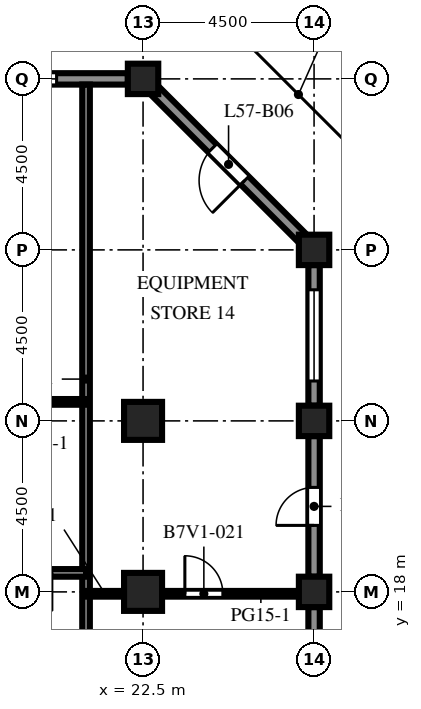
"""IFC4 building model, lengths in metres.
Left out: names, types, materials, properties, quantities, classifications, styles, units other than length and angle.
Written with IfcOpenShell. Run it as: python <this file> out.ifc"""

import sys

from ifc_helpers import new_model, si_unit, direction, frame, frame_2d, origin, origin_2d, place, context, subcontext, project, spatial, rectangle, extrude, element, fill, save


model = new_model("IFC4")
c1 = context("Model", 3, precision=1e-05, world=origin(), true_north=direction((0.0, 1.0)))
c2 = subcontext(c1, "Body", "Model", "MODEL_VIEW")
j1 = project(units=[si_unit("LENGTHUNIT", "METRE"), si_unit("PLANEANGLEUNIT", "RADIAN")], contexts=[c1])
p1 = place(None, origin())
s1 = spatial("IfcSite", under=j1, at=p1, CompositionType="ELEMENT")
p2 = place(p1, origin())
s2 = spatial("IfcBuilding", under=s1, at=p2, CompositionType="ELEMENT")
p3 = place(p2, frame((0.0, 0.0, 252.1)))
s3 = spatial("IfcBuildingStorey", under=s2, at=p3, CompositionType="ELEMENT", Elevation=252.1)
for number, where, z_axis, x_axis in (
    (1, (22.5, 31.5, 0.0), (0.0, 0.0, 1.0), (1.0, 0.0, 0.0)),
    (2, (27.0, 18.0, 0.0), (0.0, 0.0, 1.0), (1.0, 0.0, 0.0)),
    (3, (27.0, 22.5, 0.0), (0.0, 0.0, 1.0), (1.0, 0.0, 0.0)),
    (4, (27.0, 27.0, 0.0), (0.0, 0.0, 1.0), (1.0, 0.0, 0.0)),
):
    element("IfcColumn", number, at=place(p3, frame(where, z_axis=z_axis, x_axis=x_axis)), inside=s3, PredefinedType="COLUMN", context=c2, shape_type="SweptSolid", body=[
        extrude(rectangle(XDim=0.8, YDim=0.8, at=origin_2d()), origin(), (0.0, 0.0, 1.0), 4.1),
    ])
for number, where, z_axis, x_axis in (
    (5, (22.5, 18.0, 0.0), (0.0, 0.0, 1.0), (1.0, 0.0, 0.0)),
    (6, (22.5, 22.5, 0.0), (0.0, 0.0, 1.0), (1.0, 0.0, 0.0)),
):
    element("IfcColumn", number, at=place(p3, frame(where, z_axis=z_axis, x_axis=x_axis)), inside=s3, PredefinedType="COLUMN", context=c2, shape_type="SweptSolid", body=[
        extrude(rectangle(XDim=1.0, YDim=1.0, at=origin_2d()), origin(), (0.0, 0.0, 1.0), 4.1),
    ])
p4 = place(p3, frame((27.0, 17.6, 0.0), z_axis=(0.0, 0.0, 1.0), x_axis=(0.0, -1.0, 0.0)))
e7 = element("IfcWall", 7, at=p4, inside=s3, PredefinedType="SOLIDWALL", context=c2, shape_type="SweptSolid", body=[
    extrude(rectangle(XDim=3.7, YDim=0.3, at=frame_2d((1.85, 0.0))), origin(), (0.0, 0.0, 1.0), 2.85),
])
p5 = place(p4, frame((0.65, 0.0, 0.8)))
e8 = element("IfcOpeningElement", 8, at=p5, cuts=e7, PredefinedType="OPENING", context=c2, shape_type="SweptSolid", body=[
    extrude(rectangle(XDim=2.4, YDim=1.7, at=frame_2d((1.2, 0.85))), frame((0.0, 0.16, 0.0), z_axis=(0.0, -1.0, 0.0), x_axis=(1.0, 0.0, 0.0)), (0.0, 0.0, 1.0), 0.32),
])
p6 = place(p3, frame((27.0, 22.1, 0.0), z_axis=(0.0, 0.0, 1.0), x_axis=(0.0, -1.0, 0.0)))
e9 = element("IfcWall", 9, at=p6, inside=s3, PredefinedType="SOLIDWALL", context=c2, shape_type="SweptSolid", body=[
    extrude(rectangle(XDim=3.7, YDim=0.3, at=frame_2d((1.85, 0.0))), origin(), (0.0, 0.0, 1.0), 2.85),
])
p7 = place(p6, frame((1.35, 0.0, 0.0)))
e10 = element("IfcOpeningElement", 10, at=p7, cuts=e9, PredefinedType="OPENING", context=c2, shape_type="SweptSolid", body=[
    extrude(rectangle(XDim=1.0, YDim=2.2, at=frame_2d((0.5, 1.1))), frame((0.0, 0.16, 0.0), z_axis=(0.0, -1.0, 0.0), x_axis=(1.0, 0.0, 0.0)), (0.0, 0.0, 1.0), 0.32),
])
p8 = place(p3, frame((27.0, 26.6, 0.0), z_axis=(0.0, 0.0, 1.0), x_axis=(0.0, -1.0, 0.0)))
e11 = element("IfcWall", 11, at=p8, inside=s3, PredefinedType="SOLIDWALL", context=c2, shape_type="SweptSolid", body=[
    extrude(rectangle(XDim=3.7, YDim=0.3, at=frame_2d((1.85, 0.0))), origin(), (0.0, 0.0, 1.0), 2.85),
])
p9 = place(p8, frame((0.65, 0.0, 0.8)))
e12 = element("IfcOpeningElement", 12, at=p9, cuts=e11, PredefinedType="OPENING", context=c2, shape_type="SweptSolid", body=[
    extrude(rectangle(XDim=2.4, YDim=1.7, at=frame_2d((1.2, 0.85))), frame((0.0, 0.16, 0.0), z_axis=(0.0, -1.0, 0.0), x_axis=(1.0, 0.0, 0.0)), (0.0, 0.0, 1.0), 0.32),
])
p10 = place(p3, frame((22.794, 31.206, 0.0), z_axis=(0.0, 0.0, 1.0), x_axis=(0.707106781187, -0.707106781187, 0.0)))
e13 = element("IfcWall", 13, at=p10, inside=s3, PredefinedType="SOLIDWALL", context=c2, shape_type="SweptSolid", body=[
    extrude(rectangle(XDim=5.532, YDim=0.3, at=frame_2d((2.766, 0.0))), origin(), (0.0, 0.0, 1.0), 2.85),
])
p11 = place(p10, frame((2.166, 0.0, 0.0)))
e14 = element("IfcOpeningElement", 14, at=p11, cuts=e13, PredefinedType="OPENING", context=c2, shape_type="SweptSolid", body=[
    extrude(rectangle(XDim=1.2, YDim=2.2, at=frame_2d((0.6, 1.1))), frame((0.0, 0.16, 0.0), z_axis=(0.0, -1.0, 0.0), x_axis=(1.0, 0.0, 0.0)), (0.0, 0.0, 1.0), 0.32),
])
p12 = place(p3, frame((18.4, 31.5, 0.0), z_axis=(0.0, 0.0, 1.0), x_axis=(1.0, 0.0, 0.0)))
e15 = element("IfcWall", 15, at=p12, inside=s3, PredefinedType="SOLIDWALL", context=c2, shape_type="SweptSolid", body=[
    extrude(rectangle(XDim=3.7, YDim=0.3, at=frame_2d((1.85, 0.0))), origin(), (0.0, 0.0, 1.0), 2.85),
])
p13 = place(p12, frame((0.625, 0.0, 0.8)))
e16 = element("IfcOpeningElement", 16, at=p13, cuts=e15, PredefinedType="OPENING", context=c2, shape_type="SweptSolid", body=[
    extrude(rectangle(XDim=1.2, YDim=1.7, at=frame_2d((0.6, 0.85))), frame((0.0, 0.16, 0.0), z_axis=(0.0, -1.0, 0.0), x_axis=(1.0, 0.0, 0.0)), (0.0, 0.0, 1.0), 0.32),
])
p14 = place(p3, frame((21.0, 31.35, 0.0), z_axis=(0.0, 0.0, 1.0), x_axis=(0.0, -1.0, 0.0)))
e17 = element("IfcWall", 17, at=p14, inside=s3, PredefinedType="PARTITIONING", context=c2, shape_type="SweptSolid", body=[
    extrude(rectangle(XDim=25.1, YDim=0.2, at=frame_2d((12.55, 0.0))), origin(), (0.0, 0.0, 1.0), 3.65),
])
p15 = place(p14, frame((15.5, 0.0, 0.0)))
e18 = element("IfcOpeningElement", 18, at=p15, cuts=e17, PredefinedType="OPENING", context=c2, shape_type="SweptSolid", body=[
    extrude(rectangle(XDim=1.0, YDim=2.1, at=frame_2d((0.5, 1.05))), frame((0.0, 0.11, 0.0), z_axis=(0.0, -1.0, 0.0), x_axis=(1.0, 0.0, 0.0)), (0.0, 0.0, 1.0), 0.22),
])
p16 = place(p3, frame((21.0, 17.95, 0.0), z_axis=(0.0, 0.0, 1.0), x_axis=(1.0, 0.0, 0.0)))
e19 = element("IfcWall", 19, at=p16, inside=s3, PredefinedType="PARTITIONING", context=c2, shape_type="SweptSolid", body=[
    extrude(rectangle(XDim=1.0, YDim=0.15, at=frame_2d((0.5, 0.0))), origin(), (0.0, 0.0, 1.0), 3.65),
])
p17 = place(p3, frame((23.0, 17.95, 0.0), z_axis=(0.0, 0.0, 1.0), x_axis=(1.0, 0.0, 0.0)))
e20 = element("IfcWall", 20, at=p17, inside=s3, PredefinedType="PARTITIONING", context=c2, shape_type="SweptSolid", body=[
    extrude(rectangle(XDim=3.6, YDim=0.15, at=frame_2d((1.8, 0.0))), origin(), (0.0, 0.0, 1.0), 3.65),
])
p18 = place(p17, frame((0.6, 0.0, 0.0)))
e21 = element("IfcOpeningElement", 21, at=p18, cuts=e20, PredefinedType="OPENING", context=c2, shape_type="SweptSolid", body=[
    extrude(rectangle(XDim=1.0, YDim=2.1, at=frame_2d((0.5, 1.05))), frame((0.0, 0.085, 0.0), z_axis=(0.0, -1.0, 0.0), x_axis=(1.0, 0.0, 0.0)), (0.0, 0.0, 1.0), 0.17),
])
p19 = place(p3, frame((18.0, 18.5, 0.0), z_axis=(0.0, 0.0, 1.0), x_axis=(1.0, 0.0, 0.0)))
e22 = element("IfcWall", 22, at=p19, inside=s3, PredefinedType="PARTITIONING", context=c2, shape_type="SweptSolid", body=[
    extrude(rectangle(XDim=3.0, YDim=0.2, at=frame_2d((1.5, 0.0))), origin(), (0.0, 0.0, 1.0), 3.65),
])
p20 = place(p19, frame((1.1, 0.0, 0.0)))
e23 = element("IfcOpeningElement", 23, at=p20, cuts=e22, PredefinedType="OPENING", context=c2, shape_type="SweptSolid", body=[
    extrude(rectangle(XDim=1.0, YDim=2.1, at=frame_2d((0.5, 1.05))), frame((0.0, 0.11, 0.0), z_axis=(0.0, -1.0, 0.0), x_axis=(1.0, 0.0, 0.0)), (0.0, 0.0, 1.0), 0.22),
])
p21 = place(p3, frame((18.5, 23.0, 0.0), z_axis=(0.0, 0.0, 1.0), x_axis=(1.0, 0.0, 0.0)))
e24 = element("IfcWall", 24, at=p21, inside=s3, PredefinedType="PARTITIONING", context=c2, shape_type="SweptSolid", body=[
    extrude(rectangle(XDim=2.5, YDim=0.15, at=frame_2d((1.25, 0.0))), origin(), (0.0, 0.0, 1.0), 3.65),
])
p22 = place(p7, origin())
e25 = element("IfcDoor", 25, at=p22, inside=s3, OperationType="SINGLE_SWING_RIGHT", PredefinedType="DOOR", context=c2, shape_type="SweptSolid", body=[
    extrude(rectangle(XDim=1.0, YDim=2.2, at=frame_2d((0.5, 1.1))), frame((0.0, 0.025, 0.0), z_axis=(0.0, -1.0, 0.0), x_axis=(1.0, 0.0, 0.0)), (0.0, 0.0, 1.0), 0.05),
])
fill(e10, e25)
p23 = place(p9, origin())
e26 = element("IfcWindow", 26, at=p23, inside=s3, PartitioningType="SINGLE_PANEL", PredefinedType="WINDOW", context=c2, shape_type="SweptSolid", body=[
    extrude(rectangle(XDim=2.4, YDim=1.7, at=frame_2d((1.2, 0.85))), frame((0.0, 0.03, 0.0), z_axis=(0.0, -1.0, 0.0), x_axis=(1.0, 0.0, 0.0)), (0.0, 0.0, 1.0), 0.06),
])
fill(e12, e26)
p24 = place(p11, origin())
e27 = element("IfcDoor", 27, at=p24, inside=s3, OperationType="SINGLE_SWING_RIGHT", PredefinedType="DOOR", context=c2, shape_type="SweptSolid", body=[
    extrude(rectangle(XDim=1.2, YDim=2.2, at=frame_2d((0.6, 1.1))), frame((0.0, 0.025, 0.0), z_axis=(0.0, -1.0, 0.0), x_axis=(1.0, 0.0, 0.0)), (0.0, 0.0, 1.0), 0.05),
])
fill(e14, e27)
p25 = place(p13, origin())
e28 = element("IfcWindow", 28, at=p25, inside=s3, PartitioningType="SINGLE_PANEL", PredefinedType="WINDOW", context=c2, shape_type="SweptSolid", body=[
    extrude(rectangle(XDim=1.2, YDim=1.7, at=frame_2d((0.6, 0.85))), frame((0.0, 0.03, 0.0), z_axis=(0.0, -1.0, 0.0), x_axis=(1.0, 0.0, 0.0)), (0.0, 0.0, 1.0), 0.06),
])
fill(e16, e28)
p26 = place(p18, origin())
e29 = element("IfcDoor", 29, at=p26, inside=s3, OperationType="SINGLE_SWING_LEFT", PredefinedType="DOOR", context=c2, shape_type="SweptSolid", body=[
    extrude(rectangle(XDim=1.0, YDim=2.1, at=frame_2d((0.5, 1.05))), frame((0.0, 0.025, 0.0), z_axis=(0.0, -1.0, 0.0), x_axis=(1.0, 0.0, 0.0)), (0.0, 0.0, 1.0), 0.05),
])
fill(e21, e29)
save(model, sys.argv[1])
